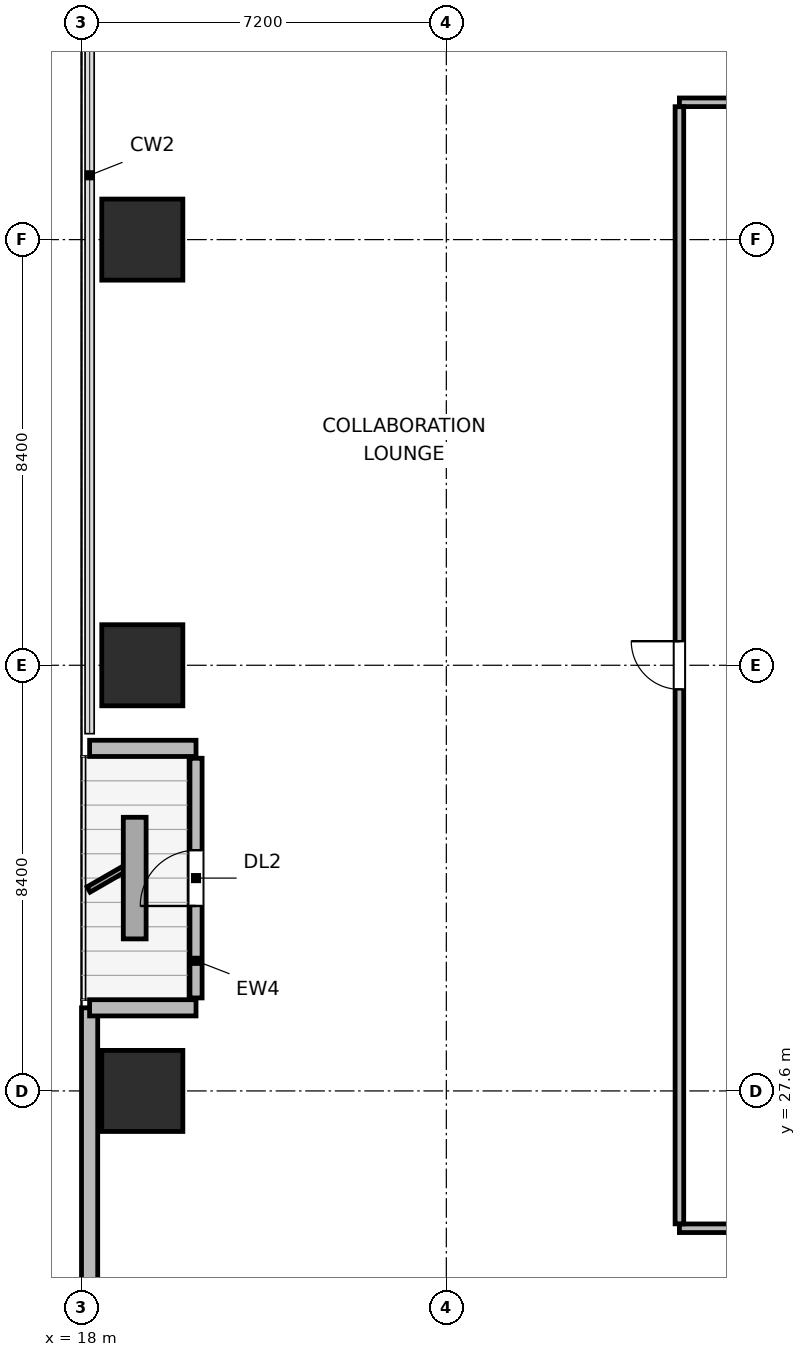
"""IFC4 building model, lengths in metres.
Left out: names, types, materials, properties, quantities, classifications, styles, units other than length and angle.
Written with IfcOpenShell. Run it as: python <this file> out.ifc"""

import sys

from ifc_helpers import new_model, si_unit, direction, frame, frame_2d, origin, origin_2d, place, context, subcontext, project, spatial, rectangle, extrude, element, fill, save


model = new_model("IFC4")
c1 = context("Model", 3, precision=1e-05, world=origin(), true_north=direction((0.0, 1.0)))
c2 = subcontext(c1, "Body", "Model", "MODEL_VIEW")
j1 = project(units=[si_unit("LENGTHUNIT", "METRE"), si_unit("PLANEANGLEUNIT", "RADIAN")], contexts=[c1])
p1 = place(None, origin())
s1 = spatial("IfcSite", under=j1, at=p1, CompositionType="ELEMENT")
p2 = place(p1, origin())
s2 = spatial("IfcBuilding", under=s1, at=p2, CompositionType="ELEMENT")
p3 = place(p2, frame((0.0, 0.0, 52.8)))
s3 = spatial("IfcBuildingStorey", under=s2, at=p3, CompositionType="ELEMENT", Elevation=52.8)
for number, where, z_axis, x_axis in (
    (1, (19.2, 27.6, 0.0), (0.0, 0.0, 1.0), (1.0, 0.0, 0.0)),
    (2, (19.2, 36.0, 0.0), (0.0, 0.0, 1.0), (1.0, 0.0, 0.0)),
    (3, (19.2, 44.4, 0.0), (0.0, 0.0, 1.0), (1.0, 0.0, 0.0)),
):
    element("IfcColumn", number, at=place(p3, frame(where, z_axis=z_axis, x_axis=x_axis)), inside=s3, PredefinedType="COLUMN", context=c2, shape_type="SweptSolid", body=[
        extrude(rectangle(XDim=1.6, YDim=1.6, at=origin_2d()), origin(), (0.0, 0.0, 1.0), 3.9),
    ])
p4 = place(p3, frame((18.16, 15.021, 0.0), z_axis=(0.0, 0.0, 1.0), x_axis=(0.0, 1.0, 0.0)))
e4 = element("IfcWall", 4, at=p4, inside=s3, PredefinedType="SOLIDWALL", context=c2, shape_type="SweptSolid", body=[
    extrude(rectangle(XDim=14.219, YDim=0.32, at=frame_2d((7.109, 0.0))), origin(), (0.0, 0.0, 1.0), 3.64),
])
p5 = place(p3, frame((18.16, 29.24, 0.0), z_axis=(0.0, 0.0, 1.0), x_axis=(1.0, 0.0, 0.0)))
e5 = element("IfcWall", 5, at=p5, inside=s3, PredefinedType="SOLIDWALL", context=c2, shape_type="SweptSolid", body=[
    extrude(rectangle(XDim=2.1, YDim=0.32, at=frame_2d((1.05, 0.0))), origin(), (0.0, 0.0, 1.0), 2.875),
])
p6 = place(p3, frame((20.26, 29.435, 0.0), z_axis=(0.0, 0.0, 1.0), x_axis=(0.0, 1.0, 0.0)))
e6 = element("IfcWall", 6, at=p6, inside=s3, PredefinedType="SOLIDWALL", context=c2, shape_type="SweptSolid", body=[
    extrude(rectangle(XDim=4.73, YDim=0.24, at=frame_2d((2.365, 0.0))), origin(), (0.0, 0.0, 1.0), 3.162),
])
p7 = place(p6, frame((1.815, 0.0, 0.0)))
e7 = element("IfcOpeningElement", 7, at=p7, cuts=e6, PredefinedType="OPENING", context=c2, shape_type="SweptSolid", body=[
    extrude(rectangle(XDim=1.1, YDim=2.04, at=frame_2d((0.55, 1.02))), frame((0.0, 0.13, 0.0), z_axis=(0.0, -1.0, 0.0), x_axis=(1.0, 0.0, 0.0)), (0.0, 0.0, 1.0), 0.26),
])
p8 = place(p3, frame((20.26, 34.36, 0.0), z_axis=(0.0, 0.0, 1.0), x_axis=(-1.0, 0.0, 0.0)))
e8 = element("IfcWall", 8, at=p8, inside=s3, PredefinedType="SOLIDWALL", context=c2, shape_type="SweptSolid", body=[
    extrude(rectangle(XDim=2.1, YDim=0.32, at=frame_2d((1.05, 0.0))), origin(), (0.0, 0.0, 1.0), 2.875),
])
p9 = place(p3, frame((29.8, 24.89, 0.0), z_axis=(0.0, 0.0, 1.0), x_axis=(1.0, 0.0, 0.0)))
e9 = element("IfcWall", 9, at=p9, inside=s3, PredefinedType="PARTITIONING", context=c2, shape_type="SweptSolid", body=[
    extrude(rectangle(XDim=36.4, YDim=0.17, at=frame_2d((18.2, 0.0))), origin(), (0.0, 0.0, 1.0), 3.64),
])
p10 = place(p9, frame((2.555, 0.0, 0.0)))
e10 = element("IfcOpeningElement", 10, at=p10, cuts=e9, PredefinedType="OPENING", context=c2, shape_type="SweptSolid", body=[
    extrude(rectangle(XDim=0.95, YDim=2.04, at=frame_2d((0.475, 1.02))), frame((0.0, 0.095, 0.0), z_axis=(0.0, -1.0, 0.0), x_axis=(1.0, 0.0, 0.0)), (0.0, 0.0, 1.0), 0.19),
])
p11 = place(p9, frame((8.01, 0.0, 0.0)))
e11 = element("IfcOpeningElement", 11, at=p11, cuts=e9, PredefinedType="OPENING", context=c2, shape_type="SweptSolid", body=[
    extrude(rectangle(XDim=0.95, YDim=2.04, at=frame_2d((0.475, 1.02))), frame((0.0, 0.095, 0.0), z_axis=(0.0, -1.0, 0.0), x_axis=(1.0, 0.0, 0.0)), (0.0, 0.0, 1.0), 0.19),
])
p12 = place(p9, frame((13.18, 0.0, 0.0)))
e12 = element("IfcOpeningElement", 12, at=p12, cuts=e9, PredefinedType="OPENING", context=c2, shape_type="SweptSolid", body=[
    extrude(rectangle(XDim=0.95, YDim=2.04, at=frame_2d((0.475, 1.02))), frame((0.0, 0.095, 0.0), z_axis=(0.0, -1.0, 0.0), x_axis=(1.0, 0.0, 0.0)), (0.0, 0.0, 1.0), 0.19),
])
p13 = place(p9, frame((18.04, 0.0, 0.0)))
e13 = element("IfcOpeningElement", 13, at=p13, cuts=e9, PredefinedType="OPENING", context=c2, shape_type="SweptSolid", body=[
    extrude(rectangle(XDim=0.95, YDim=2.04, at=frame_2d((0.475, 1.02))), frame((0.0, 0.095, 0.0), z_axis=(0.0, -1.0, 0.0), x_axis=(1.0, 0.0, 0.0)), (0.0, 0.0, 1.0), 0.19),
])
p14 = place(p9, frame((22.585, 0.0, 0.0)))
e14 = element("IfcOpeningElement", 14, at=p14, cuts=e9, PredefinedType="OPENING", context=c2, shape_type="SweptSolid", body=[
    extrude(rectangle(XDim=0.95, YDim=2.04, at=frame_2d((0.475, 1.02))), frame((0.0, 0.095, 0.0), z_axis=(0.0, -1.0, 0.0), x_axis=(1.0, 0.0, 0.0)), (0.0, 0.0, 1.0), 0.19),
])
p15 = place(p9, frame((27.44, 0.0, 0.0)))
e15 = element("IfcOpeningElement", 15, at=p15, cuts=e9, PredefinedType="OPENING", context=c2, shape_type="SweptSolid", body=[
    extrude(rectangle(XDim=0.95, YDim=2.04, at=frame_2d((0.475, 1.02))), frame((0.0, 0.095, 0.0), z_axis=(0.0, -1.0, 0.0), x_axis=(1.0, 0.0, 0.0)), (0.0, 0.0, 1.0), 0.19),
])
p16 = place(p9, frame((32.895, 0.0, 0.0)))
e16 = element("IfcOpeningElement", 16, at=p16, cuts=e9, PredefinedType="OPENING", context=c2, shape_type="SweptSolid", body=[
    extrude(rectangle(XDim=0.95, YDim=2.04, at=frame_2d((0.475, 1.02))), frame((0.0, 0.095, 0.0), z_axis=(0.0, -1.0, 0.0), x_axis=(1.0, 0.0, 0.0)), (0.0, 0.0, 1.0), 0.19),
])
p17 = place(p3, frame((29.8, 47.11, 0.0), z_axis=(0.0, 0.0, 1.0), x_axis=(1.0, 0.0, 0.0)))
e17 = element("IfcWall", 17, at=p17, inside=s3, PredefinedType="PARTITIONING", context=c2, shape_type="SweptSolid", body=[
    extrude(rectangle(XDim=36.4, YDim=0.17, at=frame_2d((18.2, 0.0))), origin(), (0.0, 0.0, 1.0), 3.64),
])
p18 = place(p17, frame((4.205, 0.0, 0.0)))
e18 = element("IfcOpeningElement", 18, at=p18, cuts=e17, PredefinedType="OPENING", context=c2, shape_type="SweptSolid", body=[
    extrude(rectangle(XDim=0.95, YDim=2.04, at=frame_2d((0.475, 1.02))), frame((0.0, 0.095, 0.0), z_axis=(0.0, -1.0, 0.0), x_axis=(1.0, 0.0, 0.0)), (0.0, 0.0, 1.0), 0.19),
])
p19 = place(p17, frame((10.385, 0.0, 0.0)))
e19 = element("IfcOpeningElement", 19, at=p19, cuts=e17, PredefinedType="OPENING", context=c2, shape_type="SweptSolid", body=[
    extrude(rectangle(XDim=0.95, YDim=2.04, at=frame_2d((0.475, 1.02))), frame((0.0, 0.095, 0.0), z_axis=(0.0, -1.0, 0.0), x_axis=(1.0, 0.0, 0.0)), (0.0, 0.0, 1.0), 0.19),
])
p20 = place(p17, frame((17.005, 0.0, 0.0)))
e20 = element("IfcOpeningElement", 20, at=p20, cuts=e17, PredefinedType="OPENING", context=c2, shape_type="SweptSolid", body=[
    extrude(rectangle(XDim=0.95, YDim=2.04, at=frame_2d((0.475, 1.02))), frame((0.0, 0.095, 0.0), z_axis=(0.0, -1.0, 0.0), x_axis=(1.0, 0.0, 0.0)), (0.0, 0.0, 1.0), 0.19),
])
p21 = place(p17, frame((24.755, 0.0, 0.0)))
e21 = element("IfcOpeningElement", 21, at=p21, cuts=e17, PredefinedType="OPENING", context=c2, shape_type="SweptSolid", body=[
    extrude(rectangle(XDim=0.95, YDim=2.04, at=frame_2d((0.475, 1.02))), frame((0.0, 0.095, 0.0), z_axis=(0.0, -1.0, 0.0), x_axis=(1.0, 0.0, 0.0)), (0.0, 0.0, 1.0), 0.19),
])
p22 = place(p17, frame((31.655, 0.0, 0.0)))
e22 = element("IfcOpeningElement", 22, at=p22, cuts=e17, PredefinedType="OPENING", context=c2, shape_type="SweptSolid", body=[
    extrude(rectangle(XDim=0.95, YDim=2.04, at=frame_2d((0.475, 1.02))), frame((0.0, 0.095, 0.0), z_axis=(0.0, -1.0, 0.0), x_axis=(1.0, 0.0, 0.0)), (0.0, 0.0, 1.0), 0.19),
])
p23 = place(p3, frame((29.8, 24.977, 0.0), z_axis=(0.0, 0.0, 1.0), x_axis=(0.0, 1.0, 0.0)))
e23 = element("IfcWall", 23, at=p23, inside=s3, PredefinedType="PARTITIONING", context=c2, shape_type="SweptSolid", body=[
    extrude(rectangle(XDim=22.046, YDim=0.17, at=frame_2d((11.023, 0.0))), origin(), (0.0, 0.0, 1.0), 3.64),
])
p24 = place(p23, frame((10.548, 0.0, 0.0)))
e24 = element("IfcOpeningElement", 24, at=p24, cuts=e23, PredefinedType="OPENING", context=c2, shape_type="SweptSolid", body=[
    extrude(rectangle(XDim=0.95, YDim=2.04, at=frame_2d((0.475, 1.02))), frame((0.0, 0.095, 0.0), z_axis=(0.0, -1.0, 0.0), x_axis=(1.0, 0.0, 0.0)), (0.0, 0.0, 1.0), 0.19),
])
p25 = place(p7, origin())
e25 = element("IfcDoor", 25, at=p25, inside=s3, OperationType="SINGLE_SWING_LEFT", PredefinedType="DOOR", context=c2, shape_type="SweptSolid", body=[
    extrude(rectangle(XDim=1.1, YDim=2.04, at=frame_2d((0.55, 1.02))), frame((0.0, 0.025, 0.0), z_axis=(0.0, -1.0, 0.0), x_axis=(1.0, 0.0, 0.0)), (0.0, 0.0, 1.0), 0.05),
])
fill(e7, e25)
p26 = place(p24, origin())
e26 = element("IfcDoor", 26, at=p26, inside=s3, OperationType="SINGLE_SWING_RIGHT", PredefinedType="DOOR", context=c2, shape_type="SweptSolid", body=[
    extrude(rectangle(XDim=0.95, YDim=2.04, at=frame_2d((0.475, 1.02))), frame((0.0, 0.025, 0.0), z_axis=(0.0, -1.0, 0.0), x_axis=(1.0, 0.0, 0.0)), (0.0, 0.0, 1.0), 0.05),
])
fill(e24, e26)
save(model, sys.argv[1])
